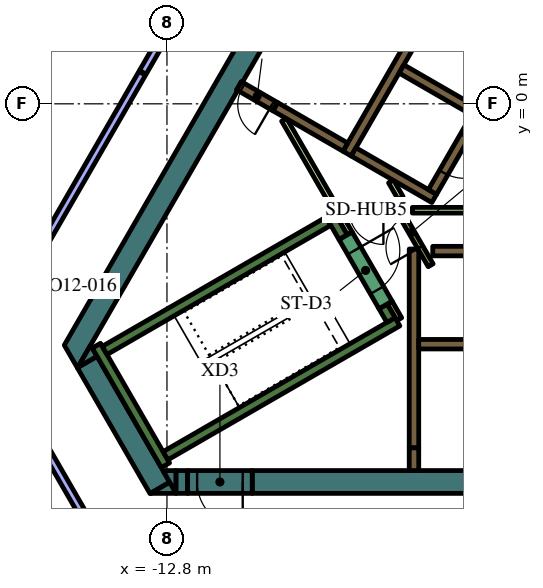
"""IFC4 building model, lengths in metres.
Left out: names, types, materials, properties, quantities, classifications, styles, units other than length and angle.
Written with IfcOpenShell. Run it as: python <this file> out.ifc"""

import sys

from ifc_helpers import new_model, si_unit, direction, frame, frame_2d, origin, place, context, subcontext, project, spatial, polyline, rectangle, outline, extrude, element, fill, save


model = new_model("IFC4")
c1 = context("Model", 3, precision=1e-05, world=origin(), true_north=direction((0.0, 1.0)))
c2 = subcontext(c1, "Body", "Model", "MODEL_VIEW")
j1 = project(units=[si_unit("LENGTHUNIT", "METRE"), si_unit("PLANEANGLEUNIT", "RADIAN")], contexts=[c1])
p1 = place(None, origin())
s1 = spatial("IfcSite", under=j1, at=p1, CompositionType="ELEMENT")
p2 = place(p1, origin())
s2 = spatial("IfcBuilding", under=s1, at=p2, CompositionType="ELEMENT")
p3 = place(p2, frame((0.0, 0.0, 283.8)))
s3 = spatial("IfcBuildingStorey", under=s2, at=p3, CompositionType="ELEMENT", Elevation=283.8)
p4 = place(p3, origin())
e1 = element("IfcWall", 1, at=p4, inside=s3, PredefinedType="SOLIDWALL", context=c2, shape_type="SweptSolid", body=[
    extrude(outline(polyline([(-15.502, -6.35), (-4.912, 11.992), (-4.393, 11.692), (-10.815, 0.569), (-10.84, 0.583), (-10.84, 0.583), (-10.84, 0.583), (-10.965, 0.367), (-10.965, 0.367), (-10.965, 0.367), (-10.94, 0.352), (-11.033, 0.191), (-14.809, -6.35), (-15.156, -6.95), (-15.502, -6.35)])), origin(), (0.0, 0.0, 1.0), 4.2),
])
p5 = place(p3, frame((-14.899, -6.795, 0.0), z_axis=(0.0, 0.0, 1.0), x_axis=(0.499950938802, -0.866053727428, 0.0)))
e2 = element("IfcWall", 2, at=p5, inside=s3, PredefinedType="SOLIDWALL", context=c2, shape_type="SweptSolid", body=[
    extrude(rectangle(XDim=3.823, YDim=0.6, at=frame_2d((1.912, 0.0))), origin(), (0.0, 0.0, 1.0), 4.2),
])
e3 = element("IfcWall", 3, at=p4, inside=s3, PredefinedType="SOLIDWALL", context=c2, shape_type="SweptSolid", body=[
    extrude(outline(polyline([(-14.64, -6.643), (-15.147, -6.936), (-14.809, -6.35), (-14.64, -6.643)])), origin(), (0.0, 0.0, 1.0), 4.2),
])
e4 = element("IfcWall", 4, at=p4, inside=s3, PredefinedType="SOLIDWALL", context=c2, shape_type="SweptSolid", body=[
    extrude(outline(polyline([(-12.557, -10.25), (-13.233, -10.25), (-12.726, -9.957), (-12.557, -10.25)])), origin(), (0.0, 0.0, 1.0), 4.2),
])
p6 = place(p3, frame((-12.257, -9.95, 0.0), z_axis=(0.0, 0.0, 1.0), x_axis=(-1.0, 0.0, 0.0)))
e5 = element("IfcWall", 5, at=p6, inside=s3, PredefinedType="SOLIDWALL", context=c2, shape_type="SweptSolid", body=[
    extrude(rectangle(XDim=0.307, YDim=0.6, at=frame_2d((0.154, 0.0))), origin(), (0.0, 0.0, 1.0), 4.2),
])
e6 = element("IfcWall", 6, at=p4, inside=s3, PredefinedType="SOLIDWALL", context=c2, shape_type="SweptSolid", body=[
    extrude(outline(polyline([(-12.904, -9.65), (-12.566, -9.65), (-12.566, -10.236), (-12.904, -9.65)])), origin(), (0.0, 0.0, 1.0), 4.2),
])
p7 = place(p3, frame((-10.556, -9.95, 0.0), z_axis=(0.0, 0.0, 1.0), x_axis=(1.0, 0.0, 0.0)))
e7 = element("IfcWall", 7, at=p7, inside=s3, PredefinedType="SOLIDWALL", context=c2, shape_type="SweptSolid", body=[
    extrude(rectangle(XDim=19.461, YDim=0.6, at=frame_2d((9.73, 0.0))), origin(), (0.0, 0.0, 1.0), 4.2),
])
p8 = place(p3, frame((-12.84, -9.511, 0.0), z_axis=(0.0, 0.0, 1.0), x_axis=(-0.499997733992, 0.866026712061, 0.0)))
e8 = element("IfcWall", 8, at=p8, inside=s3, PredefinedType="SOLIDWALL", context=c2, shape_type="SweptSolid", body=[
    extrude(rectangle(XDim=3.634, YDim=0.25, at=frame_2d((1.817, 0.0))), origin(), (0.0, 0.0, 1.0), 4.2),
])
p9 = place(p3, frame((-14.44, -6.49, 0.0), z_axis=(0.0, 0.0, 1.0), x_axis=(0.866022966069, 0.500004222222, 0.0)))
e9 = element("IfcWall", 9, at=p9, inside=s3, PredefinedType="SOLIDWALL", context=c2, shape_type="SweptSolid", body=[
    extrude(rectangle(XDim=6.8, YDim=0.25, at=frame_2d((3.4, 0.0))), origin(), (0.0, 0.0, 1.0), 4.2),
])
p10 = place(p3, frame((-8.163, -3.511, 0.0), z_axis=(0.0, 0.0, 1.0), x_axis=(-0.499994068514, 0.866028828302, 0.0)))
e10 = element("IfcWall", 10, at=p10, inside=s3, PredefinedType="SOLIDWALL", context=c2, shape_type="SweptSolid", body=[
    extrude(rectangle(XDim=0.674, YDim=0.25, at=frame_2d((0.337, 0.0))), origin(), (0.0, 0.0, 1.0), 4.2),
])
p11 = place(p3, frame((-12.84, -9.261, 0.0), z_axis=(0.0, 0.0, 1.0), x_axis=(0.866016039709, 0.500016218704, 0.0)))
e11 = element("IfcWall", 11, at=p11, inside=s3, PredefinedType="SOLIDWALL", context=c2, shape_type="SweptSolid", body=[
    extrude(rectangle(XDim=7.05, YDim=0.25, at=frame_2d((3.525, 0.0))), origin(), (0.0, 0.0, 1.0), 4.2),
])
p12 = place(p3, frame((-6.905, -5.69, 0.0), z_axis=(0.0, 0.0, 1.0), x_axis=(-0.499993700073, 0.866029041019, 0.0)))
e12 = element("IfcWall", 12, at=p12, inside=s3, PredefinedType="SOLIDWALL", context=c2, shape_type="SweptSolid", body=[
    extrude(rectangle(XDim=0.416, YDim=0.25, at=frame_2d((0.208, 0.0))), origin(), (0.0, 0.0, 1.0), 4.2),
])
p13 = place(p3, frame((-5.806, -3.875, 0.0), z_axis=(0.0, 0.0, 1.0), x_axis=(1.0, 0.0, 0.0)))
e13 = element("IfcWall", 13, at=p13, inside=s3, PredefinedType="SOLIDWALL", context=c2, shape_type="SweptSolid", body=[
    extrude(rectangle(XDim=12.231, YDim=0.25, at=frame_2d((6.116, 0.0))), origin(), (0.0, 0.0, 1.0), 4.2),
])
p14 = place(p3, frame((-6.3, -9.05, 0.0), z_axis=(0.0, 0.0, 1.0), x_axis=(0.0, 1.0, 0.0)))
e14 = element("IfcWall", 14, at=p14, inside=s3, PredefinedType="SOLIDWALL", context=c2, shape_type="SweptSolid", body=[
    extrude(rectangle(XDim=5.23, YDim=0.25, at=frame_2d((2.615, 0.0))), origin(), (0.0, 0.0, 1.0), 4.2),
])
p15 = place(p3, frame((-6.3, -9.052, 0.0), z_axis=(0.0, 0.0, 1.0), x_axis=(0.0, -1.0, 0.0)))
e15 = element("IfcWall", 15, at=p15, inside=s3, PredefinedType="SOLIDWALL", context=c2, shape_type="SweptSolid", body=[
    extrude(rectangle(XDim=0.598, YDim=0.25, at=frame_2d((0.299, 0.0))), origin(), (0.0, 0.0, 1.0), 4.2),
])
p16 = place(p3, frame((-8.06, -1.311, 0.0), z_axis=(0.0, 0.0, 1.0), x_axis=(0.50000273126, 0.866023826885, 0.0)))
e16 = element("IfcWall", 16, at=p16, inside=s3, PredefinedType="SOLIDWALL", context=c2, shape_type="SweptSolid", body=[
    extrude(rectangle(XDim=10.33, YDim=0.25, at=frame_2d((5.165, 0.0))), origin(), (0.0, 0.0, 1.0), 4.2),
])
p17 = place(p3, frame((-4.724, -0.182, 0.0), z_axis=(0.0, 0.0, 1.0), x_axis=(-0.866008176907, 0.50002983664, 0.0)))
e17 = element("IfcWall", 17, at=p17, inside=s3, PredefinedType="SOLIDWALL", context=c2, shape_type="SweptSolid", body=[
    extrude(rectangle(XDim=2.2, YDim=0.25, at=frame_2d((1.1, 0.0))), origin(), (0.0, 0.0, 1.0), 4.2),
])
p18 = place(p3, frame((-7.889, -1.265, 0.0), z_axis=(0.0, 0.0, 1.0), x_axis=(0.866057815567, -0.499943856944, 0.0)))
e18 = element("IfcWall", 18, at=p18, inside=s3, PredefinedType="SOLIDWALL", context=c2, shape_type="SweptSolid", body=[
    extrude(rectangle(XDim=2.45, YDim=0.25, at=frame_2d((1.225, 0.0))), origin(), (0.0, 0.0, 1.0), 4.2),
])
p19 = place(p3, frame((-9.95, -0.075, 0.0), z_axis=(0.0, 0.0, 1.0), x_axis=(0.865962177421, -0.500109495288, 0.0)))
e19 = element("IfcWall", 19, at=p19, inside=s3, PredefinedType="SOLIDWALL", context=c2, shape_type="SweptSolid", body=[
    extrude(rectangle(XDim=2.129, YDim=0.25, at=frame_2d((1.065, 0.0))), origin(), (0.0, 0.0, 1.0), 4.2),
])
p20 = place(p3, frame((-9.718, -0.417, 0.0), z_axis=(0.0, 0.0, 1.0), x_axis=(0.499966538646, -0.866044721844, 0.0)))
e20 = element("IfcWall", 20, at=p20, inside=s3, PredefinedType="PARTITIONING", context=c2, shape_type="SweptSolid", body=[
    extrude(rectangle(XDim=2.511, YDim=0.15, at=frame_2d((1.255, 0.0))), origin(), (0.0, 0.0, 1.0), 3.55),
])
p21 = place(p3, frame((1.438, -2.8, 0.0), z_axis=(0.0, 0.0, 1.0), x_axis=(-1.0, 0.0, 0.0)))
e21 = element("IfcWall", 21, at=p21, inside=s3, PredefinedType="PARTITIONING", context=c2, shape_type="SweptSolid", body=[
    extrude(rectangle(XDim=7.781, YDim=0.15, at=frame_2d((3.891, 0.0))), origin(), (0.0, 0.0, 1.0), 3.55),
])
p22 = place(p3, frame((-6.653, -2.477, 0.0), z_axis=(0.0, 0.0, 1.0), x_axis=(-0.500002592159, 0.866023907196, 0.0)))
e22 = element("IfcWall", 22, at=p22, inside=s3, PredefinedType="PARTITIONING", context=c2, shape_type="SweptSolid", body=[
    extrude(rectangle(XDim=0.503, YDim=0.15, at=frame_2d((0.251, 0.0))), origin(), (0.0, 0.0, 1.0), 3.55),
])
p23 = place(p3, frame((-7.99, -3.412, 0.0), z_axis=(0.0, 0.0, 1.0), x_axis=(-0.499858525911, 0.866107068482, 0.0)))
e23 = element("IfcWall", 23, at=p23, inside=s3, PredefinedType="PARTITIONING", context=c2, shape_type="SweptSolid", body=[
    extrude(rectangle(XDim=0.466, YDim=0.15, at=frame_2d((0.233, 0.0))), origin(), (0.0, 0.0, 1.0), 3.55),
])
p24 = place(p3, frame((-6.94, -5.23, 0.0), z_axis=(0.0, 0.0, 1.0), x_axis=(0.499834152157, -0.86612113491, 0.0)))
e24 = element("IfcWall", 24, at=p24, inside=s3, PredefinedType="PARTITIONING", context=c2, shape_type="SweptSolid", body=[
    extrude(rectangle(XDim=0.505, YDim=0.15, at=frame_2d((0.252, 0.0))), origin(), (0.0, 0.0, 1.0), 4.2),
])
p25 = place(p3, frame((-6.175, -6.325, 0.0), z_axis=(0.0, 0.0, 1.0), x_axis=(1.0, 0.0, 0.0)))
e25 = element("IfcWall", 25, at=p25, inside=s3, PredefinedType="SOLIDWALL", context=c2, shape_type="SweptSolid", body=[
    extrude(rectangle(XDim=12.35, YDim=0.25, at=frame_2d((6.175, 0.0))), origin(), (0.0, 0.0, 1.0), 4.2),
])
p26 = place(p25, frame((3.205, 0.0, 0.0)))
e26 = element("IfcOpeningElement", 26, at=p26, cuts=e25, PredefinedType="OPENING", context=c2, shape_type="SweptSolid", body=[
    extrude(rectangle(XDim=0.9, YDim=2.1, at=frame_2d((0.45, 1.05))), frame((0.0, 0.135, 0.0), z_axis=(0.0, -1.0, 0.0), x_axis=(1.0, 0.0, 0.0)), (0.0, 0.0, 1.0), 0.27),
])
p27 = place(p25, frame((8.145, 0.0, 0.0)))
e27 = element("IfcOpeningElement", 27, at=p27, cuts=e25, PredefinedType="OPENING", context=c2, shape_type="SweptSolid", body=[
    extrude(rectangle(XDim=1.1, YDim=2.1, at=frame_2d((0.55, 1.05))), frame((0.0, 0.135, 0.0), z_axis=(0.0, -1.0, 0.0), x_axis=(1.0, 0.0, 0.0)), (0.0, 0.0, 1.0), 0.27),
])
p28 = place(p25, frame((10.665, 0.0, 0.0)))
e28 = element("IfcOpeningElement", 28, at=p28, cuts=e25, PredefinedType="OPENING", context=c2, shape_type="SweptSolid", body=[
    extrude(rectangle(XDim=1.1, YDim=2.1, at=frame_2d((0.55, 1.05))), frame((0.0, 0.135, 0.0), z_axis=(0.0, -1.0, 0.0), x_axis=(1.0, 0.0, 0.0)), (0.0, 0.0, 1.0), 0.27),
])
p29 = place(p3, frame((-0.898, 6.194, 0.0), z_axis=(0.0, 0.0, 1.0), x_axis=(-0.499996202215, -0.866027596426, 0.0)))
e29 = element("IfcWall", 29, at=p29, inside=s3, PredefinedType="SOLIDWALL", context=c2, shape_type="SweptSolid", body=[
    extrude(rectangle(XDim=9.83, YDim=0.25, at=frame_2d((4.915, 0.0))), origin(), (0.0, 0.0, 1.0), 4.2),
])
p30 = place(p29, frame((0.585, 0.0, 0.0)))
e30 = element("IfcOpeningElement", 30, at=p30, cuts=e29, PredefinedType="OPENING", context=c2, shape_type="SweptSolid", body=[
    extrude(rectangle(XDim=1.1, YDim=2.1, at=frame_2d((0.55, 1.05))), frame((0.0, 0.135, 0.0), z_axis=(0.0, -1.0, 0.0), x_axis=(1.0, 0.0, 0.0)), (0.0, 0.0, 1.0), 0.27),
])
p31 = place(p29, frame((3.105, 0.0, 0.0)))
e31 = element("IfcOpeningElement", 31, at=p31, cuts=e29, PredefinedType="OPENING", context=c2, shape_type="SweptSolid", body=[
    extrude(rectangle(XDim=1.1, YDim=2.1, at=frame_2d((0.55, 1.05))), frame((0.0, 0.135, 0.0), z_axis=(0.0, -1.0, 0.0), x_axis=(1.0, 0.0, 0.0)), (0.0, 0.0, 1.0), 0.27),
])
p32 = place(p29, frame((5.625, 0.0, 0.0)))
e32 = element("IfcOpeningElement", 32, at=p32, cuts=e29, PredefinedType="OPENING", context=c2, shape_type="SweptSolid", body=[
    extrude(rectangle(XDim=1.1, YDim=2.1, at=frame_2d((0.55, 1.05))), frame((0.0, 0.135, 0.0), z_axis=(0.0, -1.0, 0.0), x_axis=(1.0, 0.0, 0.0)), (0.0, 0.0, 1.0), 0.27),
])
p33 = place(p29, frame((8.145, 0.0, 0.0)))
e33 = element("IfcOpeningElement", 33, at=p33, cuts=e29, PredefinedType="OPENING", context=c2, shape_type="SweptSolid", body=[
    extrude(rectangle(XDim=1.1, YDim=2.1, at=frame_2d((0.55, 1.05))), frame((0.0, 0.135, 0.0), z_axis=(0.0, -1.0, 0.0), x_axis=(1.0, 0.0, 0.0)), (0.0, 0.0, 1.0), 0.27),
])
p34 = place(p3, frame((-8.098, -3.474, 0.0), z_axis=(0.0, 0.0, 1.0), x_axis=(0.49994051562, -0.866059744384, 0.0)))
e34 = element("IfcWall", 34, at=p34, inside=s3, PredefinedType="SOLIDWALL", context=c2, shape_type="SweptSolid", body=[
    extrude(rectangle(XDim=2.1, YDim=0.4, at=frame_2d((1.05, 0.0))), origin(), (0.0, 0.0, 1.0), 4.2),
])
p35 = place(p34, frame((0.45, 0.0, 0.0)))
e35 = element("IfcOpeningElement", 35, at=p35, cuts=e34, PredefinedType="OPENING", context=c2, shape_type="SweptSolid", body=[
    extrude(rectangle(XDim=1.2, YDim=2.1, at=frame_2d((0.6, 1.05))), frame((0.0, 0.21, 0.0), z_axis=(0.0, -1.0, 0.0), x_axis=(1.0, 0.0, 0.0)), (0.0, 0.0, 1.0), 0.42),
])
p36 = place(p3, frame((-5.861, -4.248, 0.0), z_axis=(0.0, 0.0, 1.0), x_axis=(-0.500043646338, 0.866000203093, 0.0)))
e36 = element("IfcWall", 36, at=p36, inside=s3, PredefinedType="PARTITIONING", context=c2, shape_type="SweptSolid", body=[
    extrude(rectangle(XDim=1.93, YDim=0.15, at=frame_2d((0.965, 0.0))), origin(), (0.0, 0.0, 1.0), 4.2),
])
p37 = place(p36, frame((0.55, 0.0, 0.0)))
e37 = element("IfcOpeningElement", 37, at=p37, cuts=e36, PredefinedType="OPENING", context=c2, shape_type="SweptSolid", body=[
    extrude(rectangle(XDim=0.9, YDim=2.1, at=frame_2d((0.45, 1.05))), frame((0.0, 0.085, 0.0), z_axis=(0.0, -1.0, 0.0), x_axis=(1.0, 0.0, 0.0)), (0.0, 0.0, 1.0), 0.17),
])
p38 = place(p3, frame((-10.556, -9.95, 0.0), z_axis=(0.0, 0.0, 1.0), x_axis=(-1.0, 0.0, 0.0)))
e38 = element("IfcWall", 38, at=p38, inside=s3, PredefinedType="SOLIDWALL", context=c2, shape_type="SweptSolid", body=[
    extrude(rectangle(XDim=1.7, YDim=0.6, at=frame_2d((0.85, 0.0))), origin(), (0.0, 0.0, 1.0), 4.2),
])
p39 = place(p38, frame((0.25, 0.0, 0.0)))
e39 = element("IfcOpeningElement", 39, at=p39, cuts=e38, PredefinedType="OPENING", context=c2, shape_type="SweptSolid", body=[
    extrude(rectangle(XDim=1.2, YDim=2.1, at=frame_2d((0.6, 1.05))), frame((0.0, 0.31, 0.0), z_axis=(0.0, -1.0, 0.0), x_axis=(1.0, 0.0, 0.0)), (0.0, 0.0, 1.0), 0.62),
])
p40 = place(p3, frame((-6.655, -2.8, 0.0), z_axis=(0.0, 0.0, 1.0), x_axis=(-1.0, 0.0, 0.0)))
e40 = element("IfcWall", 40, at=p40, inside=s3, PredefinedType="PARTITIONING", context=c2, shape_type="SweptSolid", body=[
    extrude(rectangle(XDim=1.8, YDim=0.15, at=frame_2d((0.9, 0.0))), origin(), (0.0, 0.0, 1.0), 3.55),
])
p41 = place(p40, frame((0.45, 0.0, 0.0)))
e41 = element("IfcOpeningElement", 41, at=p41, cuts=e40, PredefinedType="OPENING", context=c2, shape_type="SweptSolid", body=[
    extrude(rectangle(XDim=0.9, YDim=2.1, at=frame_2d((0.45, 1.05))), frame((0.0, 0.085, 0.0), z_axis=(0.0, -1.0, 0.0), x_axis=(1.0, 0.0, 0.0)), (0.0, 0.0, 1.0), 0.17),
])
p42 = place(p3, frame((-9.95, -0.075, 0.0), z_axis=(0.0, 0.0, 1.0), x_axis=(-0.865952669392, 0.500125958508, 0.0)))
e42 = element("IfcWall", 42, at=p42, inside=s3, PredefinedType="SOLIDWALL", context=c2, shape_type="SweptSolid", body=[
    extrude(rectangle(XDim=1.1, YDim=0.25, at=frame_2d((0.55, 0.0))), origin(), (0.0, 0.0, 1.0), 4.2),
])
p43 = place(p42, frame((0.1, 0.0, 0.0)))
e43 = element("IfcOpeningElement", 43, at=p43, cuts=e42, PredefinedType="OPENING", context=c2, shape_type="SweptSolid", body=[
    extrude(rectangle(XDim=0.9, YDim=2.1, at=frame_2d((0.45, 1.05))), frame((0.0, 0.135, 0.0), z_axis=(0.0, -1.0, 0.0), x_axis=(1.0, 0.0, 0.0)), (0.0, 0.0, 1.0), 0.27),
])
p44 = place(p3, frame((-17.497, -0.613, 0.0), z_axis=(0.0, 0.0, 1.0), x_axis=(0.447480081559, 0.89429389834, 0.0)))
e44 = element("IfcWall", 44, at=p44, inside=s3, PredefinedType="PARTITIONING", context=c2, shape_type="SweptSolid", body=[
    extrude(rectangle(XDim=5.863, YDim=0.15, at=frame_2d((2.931, 0.0))), origin(), (0.0, 0.0, 1.0), 3.55),
])
p45 = place(p44, frame((2.463, 0.0, 0.0)))
e45 = element("IfcOpeningElement", 45, at=p45, cuts=e44, PredefinedType="OPENING", context=c2, shape_type="SweptSolid", body=[
    extrude(rectangle(XDim=0.9, YDim=2.1, at=frame_2d((0.45, 1.05))), frame((0.0, 0.085, 0.0), z_axis=(0.0, -1.0, 0.0), x_axis=(1.0, 0.0, 0.0)), (0.0, 0.0, 1.0), 0.17),
])
p46 = place(p3, frame((-7.436, 11.221, 0.0), z_axis=(0.0, 0.0, 1.0), x_axis=(-0.49999894854, -0.866026010844, 0.0)))
e46 = element("IfcWall", 46, at=p46, inside=s3, PredefinedType="PARTITIONING", context=c2, shape_type="SweptSolid", body=[
    extrude(rectangle(XDim=12.0, YDim=0.2, at=frame_2d((6.0, 0.0))), origin(), (0.0, 0.0, 1.0), 3.55),
])
p47 = place(p46, frame((5.5, 0.0, 0.0)))
e47 = element("IfcOpeningElement", 47, at=p47, cuts=e46, PredefinedType="OPENING", context=c2, shape_type="SweptSolid", body=[
    extrude(rectangle(XDim=1.0, YDim=2.1, at=frame_2d((0.5, 1.05))), frame((0.0, 0.11, 0.0), z_axis=(0.0, -1.0, 0.0), x_axis=(1.0, 0.0, 0.0)), (0.0, 0.0, 1.0), 0.22),
])
p48 = place(p3, frame((-13.451, 0.803, 0.0), z_axis=(0.0, 0.0, 1.0), x_axis=(-0.499982585408, -0.86603545787, 0.0)))
e48 = element("IfcWall", 48, at=p48, inside=s3, PredefinedType="PARTITIONING", context=c2, shape_type="SweptSolid", body=[
    extrude(rectangle(XDim=8.26, YDim=0.2, at=frame_2d((4.13, 0.0))), origin(), (0.0, 0.0, 1.0), 3.55),
])
p49 = place(p3, frame((-17.218, -6.978, 0.0), z_axis=(0.0, 0.0, 1.0), x_axis=(0.500012299885, -0.866018302326, 0.0)))
e49 = element("IfcWall", 49, at=p49, inside=s3, PredefinedType="PARTITIONING", context=c2, shape_type="SweptSolid", body=[
    extrude(rectangle(XDim=5.857, YDim=0.2, at=frame_2d((2.929, 0.0))), origin(), (0.0, 0.0, 1.0), 3.55),
])
p50 = place(p33, origin())
e50 = element("IfcDoor", 50, at=p50, inside=s3, OperationType="DOUBLE_DOOR_SLIDING", PredefinedType="DOOR", context=c2, shape_type="SweptSolid", body=[
    extrude(rectangle(XDim=1.1, YDim=2.1, at=frame_2d((0.55, 1.05))), frame((0.0, 0.025, 0.0), z_axis=(0.0, -1.0, 0.0), x_axis=(1.0, 0.0, 0.0)), (0.0, 0.0, 1.0), 0.05),
])
fill(e33, e50)
p51 = place(p35, origin())
e51 = element("IfcDoor", 51, at=p51, inside=s3, OperationType="SINGLE_SWING_LEFT", PredefinedType="DOOR", context=c2, shape_type="SweptSolid", body=[
    extrude(rectangle(XDim=1.2, YDim=2.1, at=frame_2d((0.6, 1.05))), frame((0.0, 0.025, 0.0), z_axis=(0.0, -1.0, 0.0), x_axis=(1.0, 0.0, 0.0)), (0.0, 0.0, 1.0), 0.05),
])
fill(e35, e51)
p52 = place(p37, origin())
e52 = element("IfcDoor", 52, at=p52, inside=s3, OperationType="SINGLE_SWING_LEFT", PredefinedType="DOOR", context=c2, shape_type="SweptSolid", body=[
    extrude(rectangle(XDim=0.9, YDim=2.1, at=frame_2d((0.45, 1.05))), frame((0.0, 0.025, 0.0), z_axis=(0.0, -1.0, 0.0), x_axis=(1.0, 0.0, 0.0)), (0.0, 0.0, 1.0), 0.05),
])
fill(e37, e52)
p53 = place(p39, origin())
e53 = element("IfcDoor", 53, at=p53, inside=s3, OperationType="SINGLE_SWING_LEFT", PredefinedType="DOOR", context=c2, shape_type="SweptSolid", body=[
    extrude(rectangle(XDim=1.2, YDim=2.1, at=frame_2d((0.6, 1.05))), frame((0.0, 0.025, 0.0), z_axis=(0.0, -1.0, 0.0), x_axis=(1.0, 0.0, 0.0)), (0.0, 0.0, 1.0), 0.05),
])
fill(e39, e53)
p54 = place(p41, origin())
e54 = element("IfcDoor", 54, at=p54, inside=s3, OperationType="SINGLE_SWING_LEFT", PredefinedType="DOOR", context=c2, shape_type="SweptSolid", body=[
    extrude(rectangle(XDim=0.9, YDim=2.1, at=frame_2d((0.45, 1.05))), frame((0.0, 0.025, 0.0), z_axis=(0.0, -1.0, 0.0), x_axis=(1.0, 0.0, 0.0)), (0.0, 0.0, 1.0), 0.05),
])
fill(e41, e54)
p55 = place(p43, origin())
e55 = element("IfcDoor", 55, at=p55, inside=s3, OperationType="SINGLE_SWING_LEFT", PredefinedType="DOOR", context=c2, shape_type="SweptSolid", body=[
    extrude(rectangle(XDim=0.9, YDim=2.1, at=frame_2d((0.45, 1.05))), frame((0.0, 0.025, 0.0), z_axis=(0.0, -1.0, 0.0), x_axis=(1.0, 0.0, 0.0)), (0.0, 0.0, 1.0), 0.05),
])
fill(e43, e55)
save(model, sys.argv[1])
